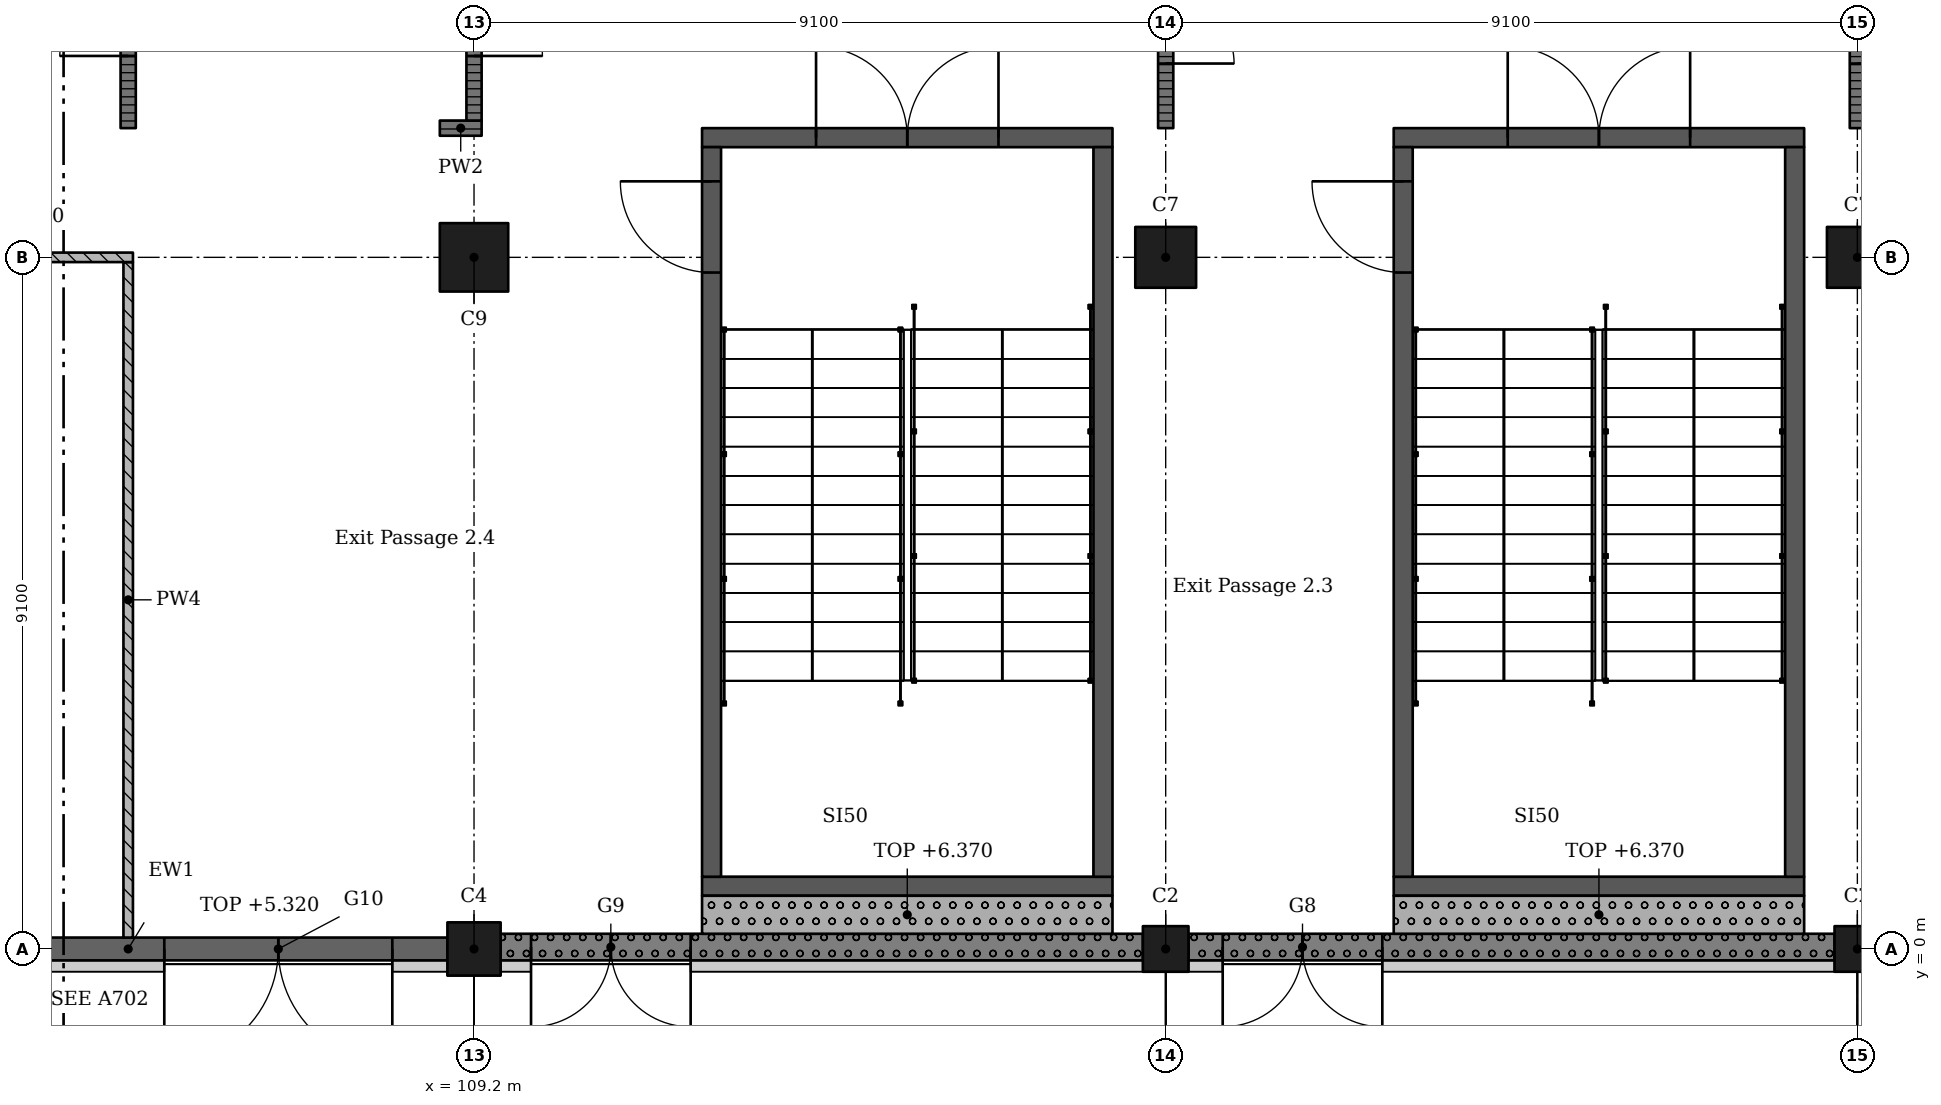
"""IFC4 building model, lengths in metres.
Left out: names, types, materials, properties, quantities, classifications, styles, units other than length and angle.
Written with IfcOpenShell. Run it as: python <this file> out.ifc"""

import sys

from ifc_helpers import new_model, si_unit, direction, frame, frame_2d, origin, origin_2d, place, context, subcontext, project, spatial, rectangle, extrude, element, fill, save


model = new_model("IFC4")
c1 = context("Model", 3, precision=1e-05, world=origin(), true_north=direction((0.0, 1.0)))
c2 = subcontext(c1, "Body", "Model", "MODEL_VIEW")
j1 = project(units=[si_unit("LENGTHUNIT", "METRE"), si_unit("PLANEANGLEUNIT", "RADIAN")], contexts=[c1])
p1 = place(None, origin())
s1 = spatial("IfcSite", under=j1, at=p1, CompositionType="ELEMENT")
p2 = place(p1, origin())
s2 = spatial("IfcBuilding", under=s1, at=p2, CompositionType="ELEMENT")
p3 = place(p2, origin())
s3 = spatial("IfcBuildingStorey", under=s2, at=p3, CompositionType="ELEMENT", Elevation=0.0)
p4 = place(p3, frame((109.2, 0.0, -0.4), z_axis=(0.0, 0.0, 1.0), x_axis=(1.0, 0.0, 0.0)))
e1 = element("IfcColumn", 1, at=p4, inside=s3, PredefinedType="COLUMN", context=c2, shape_type="SweptSolid", body=[
    extrude(rectangle(XDim=0.7, YDim=0.7, at=origin_2d()), origin(), (0.0, 0.0, 1.0), 6.77),
])
p5 = place(p3, frame((109.2, 9.1, -0.4), z_axis=(0.0, 0.0, 1.0), x_axis=(1.0, 0.0, 0.0)))
e2 = element("IfcColumn", 2, at=p5, inside=s3, PredefinedType="COLUMN", context=c2, shape_type="SweptSolid", body=[
    extrude(rectangle(XDim=0.9, YDim=0.9, at=origin_2d()), origin(), (0.0, 0.0, 1.0), 6.77),
])
p6 = place(p3, frame((118.3, 0.0, -0.4), z_axis=(0.0, 0.0, 1.0), x_axis=(1.0, 0.0, 0.0)))
e3 = element("IfcColumn", 3, at=p6, inside=s3, PredefinedType="COLUMN", context=c2, shape_type="SweptSolid", body=[
    extrude(rectangle(XDim=0.6, YDim=0.6, at=origin_2d()), origin(), (0.0, 0.0, 1.0), 6.77),
])
p7 = place(p3, frame((118.3, 9.1, -0.4), z_axis=(0.0, 0.0, 1.0), x_axis=(1.0, 0.0, 0.0)))
e4 = element("IfcColumn", 4, at=p7, inside=s3, PredefinedType="COLUMN", context=c2, shape_type="SweptSolid", body=[
    extrude(rectangle(XDim=0.8, YDim=0.8, at=origin_2d()), origin(), (0.0, 0.0, 1.0), 6.77),
])
p8 = place(p3, frame((127.4, 0.0, -0.4), z_axis=(0.0, 0.0, 1.0), x_axis=(1.0, 0.0, 0.0)))
e5 = element("IfcColumn", 5, at=p8, inside=s3, PredefinedType="COLUMN", context=c2, shape_type="SweptSolid", body=[
    extrude(rectangle(XDim=0.6, YDim=0.6, at=origin_2d()), origin(), (0.0, 0.0, 1.0), 6.77),
])
p9 = place(p3, frame((127.4, 9.1, -0.4), z_axis=(0.0, 0.0, 1.0), x_axis=(1.0, 0.0, 0.0)))
e6 = element("IfcColumn", 6, at=p9, inside=s3, PredefinedType="COLUMN", context=c2, shape_type="SweptSolid", body=[
    extrude(rectangle(XDim=0.8, YDim=0.8, at=origin_2d()), origin(), (0.0, 0.0, 1.0), 6.77),
])
p10 = place(p3, frame((126.7, 0.825, -0.4), z_axis=(0.0, 0.0, 1.0), x_axis=(-1.0, 0.0, 0.0)))
e7 = element("IfcWall", 7, at=p10, inside=s3, PredefinedType="SHEAR", context=c2, shape_type="SweptSolid", body=[
    extrude(rectangle(XDim=5.4, YDim=0.25, at=frame_2d((2.7, 0.0))), origin(), (0.0, 0.0, 1.0), 6.77),
])
p11 = place(p3, frame((126.7, 10.675, -0.4), z_axis=(0.0, 0.0, 1.0), x_axis=(-1.0, 0.0, 0.0)))
e8 = element("IfcWall", 8, at=p11, inside=s3, PredefinedType="SHEAR", context=c2, shape_type="SweptSolid", body=[
    extrude(rectangle(XDim=5.4, YDim=0.25, at=frame_2d((2.7, 0.0))), origin(), (0.0, 0.0, 1.0), 6.77),
])
p12 = place(p11, frame((1.5, 0.0, 0.4)))
e9 = element("IfcOpeningElement", 9, at=p12, cuts=e8, PredefinedType="OPENING", context=c2, shape_type="SweptSolid", body=[
    extrude(rectangle(XDim=2.4, YDim=2.1, at=frame_2d((1.2, 1.05))), frame((0.0, 0.135, 0.0), z_axis=(0.0, -1.0, 0.0), x_axis=(1.0, 0.0, 0.0)), (0.0, 0.0, 1.0), 0.27),
])
p13 = place(p3, frame((121.425, 10.55, -0.4), z_axis=(0.0, 0.0, 1.0), x_axis=(0.0, -1.0, 0.0)))
e10 = element("IfcWall", 10, at=p13, inside=s3, PredefinedType="SHEAR", context=c2, shape_type="SweptSolid", body=[
    extrude(rectangle(XDim=9.6, YDim=0.25, at=frame_2d((4.8, 0.0))), origin(), (0.0, 0.0, 1.0), 6.77),
])
p14 = place(p13, frame((0.45, 0.0, 0.4)))
e11 = element("IfcOpeningElement", 11, at=p14, cuts=e10, PredefinedType="OPENING", context=c2, shape_type="SweptSolid", body=[
    extrude(rectangle(XDim=1.2, YDim=2.1, at=frame_2d((0.6, 1.05))), frame((0.0, 0.135, 0.0), z_axis=(0.0, -1.0, 0.0), x_axis=(1.0, 0.0, 0.0)), (0.0, 0.0, 1.0), 0.27),
])
p15 = place(p3, frame((126.575, 10.55, -0.4), z_axis=(0.0, 0.0, 1.0), x_axis=(0.0, -1.0, 0.0)))
e12 = element("IfcWall", 12, at=p15, inside=s3, PredefinedType="SHEAR", context=c2, shape_type="SweptSolid", body=[
    extrude(rectangle(XDim=9.6, YDim=0.25, at=frame_2d((4.8, 0.0))), origin(), (0.0, 0.0, 1.0), 6.77),
])
p16 = place(p3, frame((117.6, 0.825, -0.4), z_axis=(0.0, 0.0, 1.0), x_axis=(-1.0, 0.0, 0.0)))
e13 = element("IfcWall", 13, at=p16, inside=s3, PredefinedType="SHEAR", context=c2, shape_type="SweptSolid", body=[
    extrude(rectangle(XDim=5.4, YDim=0.25, at=frame_2d((2.7, 0.0))), origin(), (0.0, 0.0, 1.0), 6.77),
])
p17 = place(p3, frame((117.6, 10.675, -0.4), z_axis=(0.0, 0.0, 1.0), x_axis=(-1.0, 0.0, 0.0)))
e14 = element("IfcWall", 14, at=p17, inside=s3, PredefinedType="SHEAR", context=c2, shape_type="SweptSolid", body=[
    extrude(rectangle(XDim=5.4, YDim=0.25, at=frame_2d((2.7, 0.0))), origin(), (0.0, 0.0, 1.0), 6.77),
])
p18 = place(p17, frame((1.5, 0.0, 0.4)))
e15 = element("IfcOpeningElement", 15, at=p18, cuts=e14, PredefinedType="OPENING", context=c2, shape_type="SweptSolid", body=[
    extrude(rectangle(XDim=2.4, YDim=2.1, at=frame_2d((1.2, 1.05))), frame((0.0, 0.135, 0.0), z_axis=(0.0, -1.0, 0.0), x_axis=(1.0, 0.0, 0.0)), (0.0, 0.0, 1.0), 0.27),
])
p19 = place(p3, frame((112.325, 10.55, -0.4), z_axis=(0.0, 0.0, 1.0), x_axis=(0.0, -1.0, 0.0)))
e16 = element("IfcWall", 16, at=p19, inside=s3, PredefinedType="SHEAR", context=c2, shape_type="SweptSolid", body=[
    extrude(rectangle(XDim=9.6, YDim=0.25, at=frame_2d((4.8, 0.0))), origin(), (0.0, 0.0, 1.0), 6.77),
])
p20 = place(p19, frame((0.45, 0.0, 0.4)))
e17 = element("IfcOpeningElement", 17, at=p20, cuts=e16, PredefinedType="OPENING", context=c2, shape_type="SweptSolid", body=[
    extrude(rectangle(XDim=1.2, YDim=2.1, at=frame_2d((0.6, 1.05))), frame((0.0, 0.135, 0.0), z_axis=(0.0, -1.0, 0.0), x_axis=(1.0, 0.0, 0.0)), (0.0, 0.0, 1.0), 0.27),
])
p21 = place(p3, frame((117.475, 10.55, -0.4), z_axis=(0.0, 0.0, 1.0), x_axis=(0.0, -1.0, 0.0)))
e18 = element("IfcWall", 18, at=p21, inside=s3, PredefinedType="SHEAR", context=c2, shape_type="SweptSolid", body=[
    extrude(rectangle(XDim=9.6, YDim=0.25, at=frame_2d((4.8, 0.0))), origin(), (0.0, 0.0, 1.0), 6.77),
])
p22 = place(p3, frame((100.45, 0.0, 0.0), z_axis=(0.0, 0.0, 1.0), x_axis=(1.0, 0.0, 0.0)))
e19 = element("IfcWall", 19, at=p22, inside=s3, PredefinedType="SOLIDWALL", context=c2, shape_type="SweptSolid", body=[
    extrude(rectangle(XDim=8.4, YDim=0.3, at=frame_2d((4.2, 0.0))), origin(), (0.0, 0.0, 1.0), 5.32),
])
p23 = place(p22, frame((4.675, 0.0, 0.0)))
e20 = element("IfcOpeningElement", 20, at=p23, cuts=e19, PredefinedType="OPENING", context=c2, shape_type="SweptSolid", body=[
    extrude(rectangle(XDim=3.0, YDim=2.4, at=frame_2d((1.5, 1.2))), frame((0.0, 0.16, 0.0), z_axis=(0.0, -1.0, 0.0), x_axis=(1.0, 0.0, 0.0)), (0.0, 0.0, 1.0), 0.32),
])
p24 = place(p3, frame((109.55, 0.025, 0.0), z_axis=(0.0, 0.0, 1.0), x_axis=(1.0, 0.0, 0.0)))
e21 = element("IfcWall", 21, at=p24, inside=s3, PredefinedType="SOLIDWALL", context=c2, shape_type="SweptSolid", body=[
    extrude(rectangle(XDim=8.45, YDim=0.35, at=frame_2d((4.225, 0.0))), origin(), (0.0, 0.0, 1.0), 5.27),
])
p25 = place(p24, frame((0.4, 0.0, 0.0)))
e22 = element("IfcOpeningElement", 22, at=p25, cuts=e21, PredefinedType="OPENING", context=c2, shape_type="SweptSolid", body=[
    extrude(rectangle(XDim=2.1, YDim=2.4, at=frame_2d((1.05, 1.2))), frame((0.0, 0.185, 0.0), z_axis=(0.0, -1.0, 0.0), x_axis=(1.0, 0.0, 0.0)), (0.0, 0.0, 1.0), 0.37),
])
p26 = place(p3, frame((118.6, 0.025, 0.0), z_axis=(0.0, 0.0, 1.0), x_axis=(1.0, 0.0, 0.0)))
e23 = element("IfcWall", 23, at=p26, inside=s3, PredefinedType="SOLIDWALL", context=c2, shape_type="SweptSolid", body=[
    extrude(rectangle(XDim=8.5, YDim=0.35, at=frame_2d((4.25, 0.0))), origin(), (0.0, 0.0, 1.0), 5.27),
])
p27 = place(p26, frame((0.45, 0.0, 0.0)))
e24 = element("IfcOpeningElement", 24, at=p27, cuts=e23, PredefinedType="OPENING", context=c2, shape_type="SweptSolid", body=[
    extrude(rectangle(XDim=2.1, YDim=2.4, at=frame_2d((1.05, 1.2))), frame((0.0, 0.185, 0.0), z_axis=(0.0, -1.0, 0.0), x_axis=(1.0, 0.0, 0.0)), (0.0, 0.0, 1.0), 0.37),
])
p28 = place(p3, frame((121.3, 0.45, 0.0), z_axis=(0.0, 0.0, 1.0), x_axis=(1.0, 0.0, 0.0)))
e25 = element("IfcWall", 25, at=p28, inside=s3, PredefinedType="SOLIDWALL", context=c2, shape_type="SweptSolid", body=[
    extrude(rectangle(XDim=5.4, YDim=0.5, at=frame_2d((2.7, 0.0))), origin(), (0.0, 0.0, 1.0), 6.37),
])
p29 = place(p3, frame((112.2, 0.45, 0.0), z_axis=(0.0, 0.0, 1.0), x_axis=(1.0, 0.0, 0.0)))
e26 = element("IfcWall", 26, at=p29, inside=s3, PredefinedType="SOLIDWALL", context=c2, shape_type="SweptSolid", body=[
    extrude(rectangle(XDim=5.4, YDim=0.5, at=frame_2d((2.7, 0.0))), origin(), (0.0, 0.0, 1.0), 6.37),
])
p30 = place(p3, frame((104.65, 0.15, 0.0), z_axis=(0.0, 0.0, 1.0), x_axis=(0.0, 1.0, 0.0)))
e27 = element("IfcWall", 27, at=p30, inside=s3, PredefinedType="PARTITIONING", context=c2, shape_type="SweptSolid", body=[
    extrude(rectangle(XDim=8.888, YDim=0.125, at=frame_2d((4.444, 0.0))), origin(), (0.0, 0.0, 1.0), 6.02),
])
p31 = place(p3, frame((104.65, 10.8, 0.0), z_axis=(0.0, 0.0, 1.0), x_axis=(0.0, 1.0, 0.0)))
e28 = element("IfcWall", 28, at=p31, inside=s3, PredefinedType="PARTITIONING", context=c2, shape_type="SweptSolid", body=[
    extrude(rectangle(XDim=7.3, YDim=0.2, at=frame_2d((3.65, 0.0))), origin(), (0.0, 0.0, 1.0), 6.02),
])
p32 = place(p31, frame((0.95, 0.0, 0.0)))
e29 = element("IfcOpeningElement", 29, at=p32, cuts=e28, PredefinedType="OPENING", context=c2, shape_type="SweptSolid", body=[
    extrude(rectangle(XDim=1.8, YDim=2.4, at=frame_2d((0.9, 1.2))), frame((0.0, 0.11, 0.0), z_axis=(0.0, -1.0, 0.0), x_axis=(1.0, 0.0, 0.0)), (0.0, 0.0, 1.0), 0.22),
])
p33 = place(p31, frame((4.55, 0.0, 0.0)))
e30 = element("IfcOpeningElement", 30, at=p33, cuts=e28, PredefinedType="OPENING", context=c2, shape_type="SweptSolid", body=[
    extrude(rectangle(XDim=1.8, YDim=2.4, at=frame_2d((0.9, 1.2))), frame((0.0, 0.11, 0.0), z_axis=(0.0, -1.0, 0.0), x_axis=(1.0, 0.0, 0.0)), (0.0, 0.0, 1.0), 0.22),
])
p34 = place(p3, frame((104.712, 9.1, 0.0), z_axis=(0.0, 0.0, 1.0), x_axis=(-1.0, 0.0, 0.0)))
e31 = element("IfcWall", 31, at=p34, inside=s3, PredefinedType="PARTITIONING", context=c2, shape_type="SweptSolid", body=[
    extrude(rectangle(XDim=4.062, YDim=0.125, at=frame_2d((2.031, 0.0))), origin(), (0.0, 0.0, 1.0), 5.32),
])
p35 = place(p34, frame((1.55, 0.0, 0.0)))
e32 = element("IfcOpeningElement", 32, at=p35, cuts=e31, PredefinedType="OPENING", context=c2, shape_type="SweptSolid", body=[
    extrude(rectangle(XDim=1.0, YDim=2.1, at=frame_2d((0.5, 1.05))), frame((0.0, 0.073, 0.0), z_axis=(0.0, -1.0, 0.0), x_axis=(1.0, 0.0, 0.0)), (0.0, 0.0, 1.0), 0.145),
])
p36 = place(p3, frame((108.75, 10.8, 0.0), z_axis=(0.0, 0.0, 1.0), x_axis=(1.0, 0.0, 0.0)))
e33 = element("IfcWall", 33, at=p36, inside=s3, PredefinedType="PARTITIONING", context=c2, shape_type="SweptSolid", body=[
    extrude(rectangle(XDim=0.55, YDim=0.2, at=frame_2d((0.275, 0.0))), origin(), (0.0, 0.0, 1.0), 6.02),
])
p37 = place(p3, frame((109.2, 10.9, 0.0), z_axis=(0.0, 0.0, 1.0), x_axis=(0.0, 1.0, 0.0)))
e34 = element("IfcWall", 34, at=p37, inside=s3, PredefinedType="PARTITIONING", context=c2, shape_type="SweptSolid", body=[
    extrude(rectangle(XDim=6.825, YDim=0.2, at=frame_2d((3.413, 0.0))), origin(), (0.0, 0.0, 1.0), 5.32),
])
p38 = place(p37, frame((0.85, 0.0, 0.0)))
e35 = element("IfcOpeningElement", 35, at=p38, cuts=e34, PredefinedType="OPENING", context=c2, shape_type="SweptSolid", body=[
    extrude(rectangle(XDim=1.8, YDim=2.4, at=frame_2d((0.9, 1.2))), frame((0.0, 0.11, 0.0), z_axis=(0.0, -1.0, 0.0), x_axis=(1.0, 0.0, 0.0)), (0.0, 0.0, 1.0), 0.22),
])
p39 = place(p37, frame((4.25, 0.0, 0.0)))
e36 = element("IfcOpeningElement", 36, at=p39, cuts=e34, PredefinedType="OPENING", context=c2, shape_type="SweptSolid", body=[
    extrude(rectangle(XDim=1.8, YDim=2.4, at=frame_2d((0.9, 1.2))), frame((0.0, 0.11, 0.0), z_axis=(0.0, -1.0, 0.0), x_axis=(1.0, 0.0, 0.0)), (0.0, 0.0, 1.0), 0.22),
])
p40 = place(p3, frame((118.3, 10.8, 0.0), z_axis=(0.0, 0.0, 1.0), x_axis=(0.0, 1.0, 0.0)))
e37 = element("IfcWall", 37, at=p40, inside=s3, PredefinedType="PARTITIONING", context=c2, shape_type="SweptSolid", body=[
    extrude(rectangle(XDim=6.925, YDim=0.2, at=frame_2d((3.462, 0.0))), origin(), (0.0, 0.0, 1.0), 5.32),
])
p41 = place(p40, frame((0.85, 0.0, 0.0)))
e38 = element("IfcOpeningElement", 38, at=p41, cuts=e37, PredefinedType="OPENING", context=c2, shape_type="SweptSolid", body=[
    extrude(rectangle(XDim=1.8, YDim=2.4, at=frame_2d((0.9, 1.2))), frame((0.0, 0.11, 0.0), z_axis=(0.0, -1.0, 0.0), x_axis=(1.0, 0.0, 0.0)), (0.0, 0.0, 1.0), 0.22),
])
p42 = place(p40, frame((4.25, 0.0, 0.0)))
e39 = element("IfcOpeningElement", 39, at=p42, cuts=e37, PredefinedType="OPENING", context=c2, shape_type="SweptSolid", body=[
    extrude(rectangle(XDim=1.8, YDim=2.4, at=frame_2d((0.9, 1.2))), frame((0.0, 0.11, 0.0), z_axis=(0.0, -1.0, 0.0), x_axis=(1.0, 0.0, 0.0)), (0.0, 0.0, 1.0), 0.22),
])
p43 = place(p3, frame((127.4, 10.8, 0.0), z_axis=(0.0, 0.0, 1.0), x_axis=(0.0, 1.0, 0.0)))
e40 = element("IfcWall", 40, at=p43, inside=s3, PredefinedType="PARTITIONING", context=c2, shape_type="SweptSolid", body=[
    extrude(rectangle(XDim=6.95, YDim=0.2, at=frame_2d((3.475, 0.0))), origin(), (0.0, 0.0, 1.0), 5.32),
])
p44 = place(p43, frame((0.85, 0.0, 0.0)))
e41 = element("IfcOpeningElement", 41, at=p44, cuts=e40, PredefinedType="OPENING", context=c2, shape_type="SweptSolid", body=[
    extrude(rectangle(XDim=1.8, YDim=2.4, at=frame_2d((0.9, 1.2))), frame((0.0, 0.11, 0.0), z_axis=(0.0, -1.0, 0.0), x_axis=(1.0, 0.0, 0.0)), (0.0, 0.0, 1.0), 0.22),
])
p45 = place(p43, frame((4.35, 0.0, 0.0)))
e42 = element("IfcOpeningElement", 42, at=p45, cuts=e40, PredefinedType="OPENING", context=c2, shape_type="SweptSolid", body=[
    extrude(rectangle(XDim=1.8, YDim=2.4, at=frame_2d((0.9, 1.2))), frame((0.0, 0.11, 0.0), z_axis=(0.0, -1.0, 0.0), x_axis=(1.0, 0.0, 0.0)), (0.0, 0.0, 1.0), 0.22),
])
p46 = place(p23, frame((3.0, 0.0, 0.0), z_axis=(0.0, 0.0, 1.0), x_axis=(-1.0, 0.0, 0.0)))
e43 = element("IfcDoor", 43, at=p46, inside=s3, OperationType="DOUBLE_DOOR_SINGLE_SWING", PredefinedType="DOOR", context=c2, shape_type="SweptSolid", body=[
    extrude(rectangle(XDim=3.0, YDim=2.4, at=frame_2d((1.5, 1.2))), frame((0.0, 0.025, 0.0), z_axis=(0.0, -1.0, 0.0), x_axis=(1.0, 0.0, 0.0)), (0.0, 0.0, 1.0), 0.05),
])
fill(e20, e43)
p47 = place(p25, frame((2.1, 0.0, 0.0), z_axis=(0.0, 0.0, 1.0), x_axis=(-1.0, 0.0, 0.0)))
e44 = element("IfcDoor", 44, at=p47, inside=s3, OperationType="DOUBLE_DOOR_SINGLE_SWING", PredefinedType="DOOR", context=c2, shape_type="SweptSolid", body=[
    extrude(rectangle(XDim=2.1, YDim=2.4, at=frame_2d((1.05, 1.2))), frame((0.0, 0.025, 0.0), z_axis=(0.0, -1.0, 0.0), x_axis=(1.0, 0.0, 0.0)), (0.0, 0.0, 1.0), 0.05),
])
fill(e22, e44)
p48 = place(p27, frame((2.1, 0.0, 0.0), z_axis=(0.0, 0.0, 1.0), x_axis=(-1.0, 0.0, 0.0)))
e45 = element("IfcDoor", 45, at=p48, inside=s3, OperationType="DOUBLE_DOOR_SINGLE_SWING", PredefinedType="DOOR", context=c2, shape_type="SweptSolid", body=[
    extrude(rectangle(XDim=2.1, YDim=2.4, at=frame_2d((1.05, 1.2))), frame((0.0, 0.025, 0.0), z_axis=(0.0, -1.0, 0.0), x_axis=(1.0, 0.0, 0.0)), (0.0, 0.0, 1.0), 0.05),
])
fill(e24, e45)
p49 = place(p44, origin())
e46 = element("IfcDoor", 46, at=p49, inside=s3, OperationType="DOUBLE_DOOR_SINGLE_SWING", PredefinedType="DOOR", context=c2, shape_type="SweptSolid", body=[
    extrude(rectangle(XDim=1.8, YDim=2.4, at=frame_2d((0.9, 1.2))), frame((0.0, 0.025, 0.0), z_axis=(0.0, -1.0, 0.0), x_axis=(1.0, 0.0, 0.0)), (0.0, 0.0, 1.0), 0.05),
])
fill(e41, e46)
p50 = place(p41, origin())
e47 = element("IfcDoor", 47, at=p50, inside=s3, OperationType="DOUBLE_DOOR_SINGLE_SWING", PredefinedType="DOOR", context=c2, shape_type="SweptSolid", body=[
    extrude(rectangle(XDim=1.8, YDim=2.4, at=frame_2d((0.9, 1.2))), frame((0.0, 0.025, 0.0), z_axis=(0.0, -1.0, 0.0), x_axis=(1.0, 0.0, 0.0)), (0.0, 0.0, 1.0), 0.05),
])
fill(e38, e47)
p51 = place(p38, origin())
e48 = element("IfcDoor", 48, at=p51, inside=s3, OperationType="DOUBLE_DOOR_SINGLE_SWING", PredefinedType="DOOR", context=c2, shape_type="SweptSolid", body=[
    extrude(rectangle(XDim=1.8, YDim=2.4, at=frame_2d((0.9, 1.2))), frame((0.0, 0.025, 0.0), z_axis=(0.0, -1.0, 0.0), x_axis=(1.0, 0.0, 0.0)), (0.0, 0.0, 1.0), 0.05),
])
fill(e35, e48)
p52 = place(p32, origin())
e49 = element("IfcDoor", 49, at=p52, inside=s3, OperationType="DOUBLE_DOOR_SINGLE_SWING", PredefinedType="DOOR", context=c2, shape_type="SweptSolid", body=[
    extrude(rectangle(XDim=1.8, YDim=2.4, at=frame_2d((0.9, 1.2))), frame((0.0, 0.025, 0.0), z_axis=(0.0, -1.0, 0.0), x_axis=(1.0, 0.0, 0.0)), (0.0, 0.0, 1.0), 0.05),
])
fill(e29, e49)
p53 = place(p12, origin())
e50 = element("IfcDoor", 50, at=p53, inside=s3, OperationType="DOUBLE_DOOR_SINGLE_SWING", PredefinedType="DOOR", context=c2, shape_type="SweptSolid", body=[
    extrude(rectangle(XDim=2.4, YDim=2.1, at=frame_2d((1.2, 1.05))), frame((0.0, 0.025, 0.0), z_axis=(0.0, -1.0, 0.0), x_axis=(1.0, 0.0, 0.0)), (0.0, 0.0, 1.0), 0.05),
])
fill(e9, e50)
p54 = place(p18, origin())
e51 = element("IfcDoor", 51, at=p54, inside=s3, OperationType="DOUBLE_DOOR_SINGLE_SWING", PredefinedType="DOOR", context=c2, shape_type="SweptSolid", body=[
    extrude(rectangle(XDim=2.4, YDim=2.1, at=frame_2d((1.2, 1.05))), frame((0.0, 0.025, 0.0), z_axis=(0.0, -1.0, 0.0), x_axis=(1.0, 0.0, 0.0)), (0.0, 0.0, 1.0), 0.05),
])
fill(e15, e51)
p55 = place(p14, origin())
e52 = element("IfcDoor", 52, at=p55, inside=s3, OperationType="SINGLE_SWING_LEFT", PredefinedType="DOOR", context=c2, shape_type="SweptSolid", body=[
    extrude(rectangle(XDim=1.2, YDim=2.1, at=frame_2d((0.6, 1.05))), frame((0.0, 0.025, 0.0), z_axis=(0.0, -1.0, 0.0), x_axis=(1.0, 0.0, 0.0)), (0.0, 0.0, 1.0), 0.05),
])
fill(e11, e52)
p56 = place(p20, origin())
e53 = element("IfcDoor", 53, at=p56, inside=s3, OperationType="SINGLE_SWING_LEFT", PredefinedType="DOOR", context=c2, shape_type="SweptSolid", body=[
    extrude(rectangle(XDim=1.2, YDim=2.1, at=frame_2d((0.6, 1.05))), frame((0.0, 0.025, 0.0), z_axis=(0.0, -1.0, 0.0), x_axis=(1.0, 0.0, 0.0)), (0.0, 0.0, 1.0), 0.05),
])
fill(e17, e53)
save(model, sys.argv[1])
